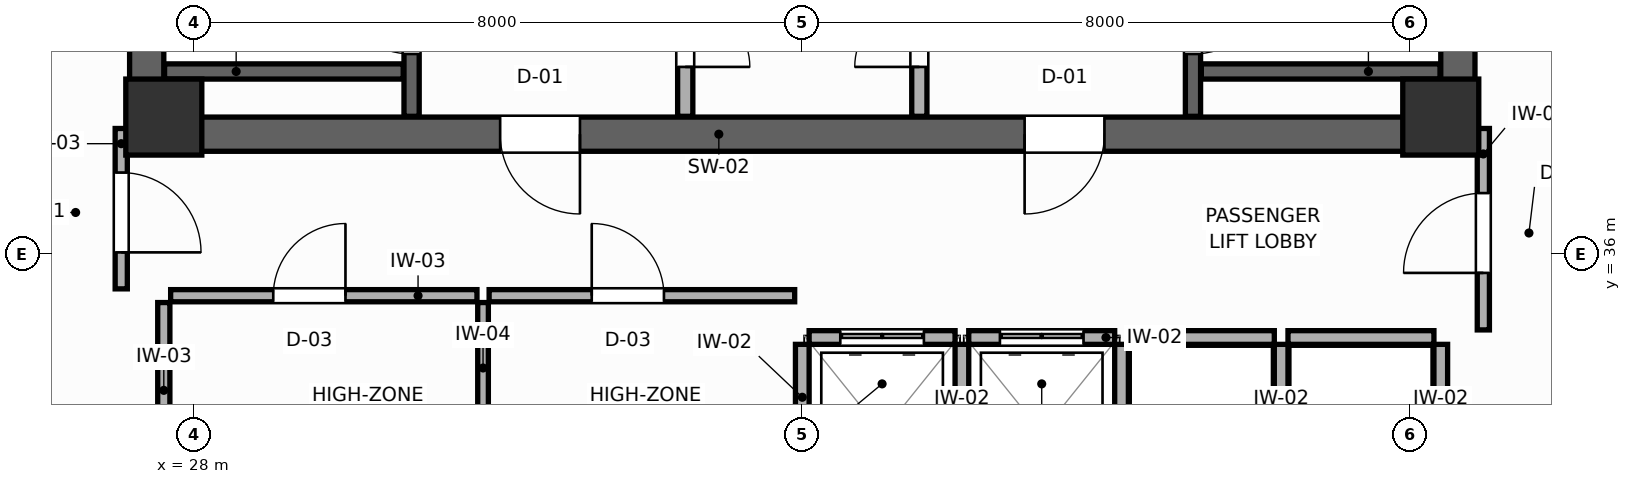
"""IFC4 building model, lengths in metres.
Left out: names, types, materials, properties, quantities, classifications, styles, units other than length and angle.
Written with IfcOpenShell. Run it as: python <this file> out.ifc"""

import sys

from ifc_helpers import new_model, si_unit, direction, frame, frame_2d, origin, origin_2d, place, context, subcontext, project, spatial, rectangle, extrude, source, transform, mapped, element, fill, save


model = new_model("IFC4")
c1 = context("Model", 3, precision=1e-05, world=origin(), true_north=direction((0.0, 1.0)))
c2 = subcontext(c1, "Body", "Model", "MODEL_VIEW")
j1 = project(units=[si_unit("LENGTHUNIT", "METRE"), si_unit("PLANEANGLEUNIT", "RADIAN")], contexts=[c1])
p1 = place(None, origin())
s1 = spatial("IfcSite", under=j1, at=p1, CompositionType="ELEMENT")
p2 = place(p1, origin())
s2 = spatial("IfcBuilding", under=s1, at=p2, CompositionType="ELEMENT")
p3 = place(p2, frame((0.0, 0.0, 179.4)))
s3 = spatial("IfcBuildingStorey", under=s2, at=p3, CompositionType="ELEMENT", Elevation=179.4)
p4 = place(p3, frame((27.15, 37.575, 0.0), z_axis=(0.0, 0.0, 1.0), x_axis=(1.0, 0.0, 0.0)))
e1 = element("IfcWall", 1, at=p4, inside=s3, PredefinedType="SHEAR", context=c2, shape_type="SweptSolid", body=[
    extrude(rectangle(XDim=17.7, YDim=0.45, at=frame_2d((8.85, 0.0))), origin(), (0.0, 0.0, 1.0), 3.6),
])
p5 = place(p4, frame((4.875, 0.0, 0.0)))
e2 = element("IfcOpeningElement", 2, at=p5, cuts=e1, PredefinedType="OPENING", context=c2, shape_type="SweptSolid", body=[
    extrude(rectangle(XDim=1.05, YDim=2.1, at=frame_2d((0.525, 1.05))), frame((0.0, 0.235, 0.0), z_axis=(0.0, -1.0, 0.0), x_axis=(1.0, 0.0, 0.0)), (0.0, 0.0, 1.0), 0.47),
])
p6 = place(p4, frame((11.775, 0.0, 0.0)))
e3 = element("IfcOpeningElement", 3, at=p6, cuts=e1, PredefinedType="OPENING", context=c2, shape_type="SweptSolid", body=[
    extrude(rectangle(XDim=1.05, YDim=2.1, at=frame_2d((0.525, 1.05))), frame((0.0, 0.235, 0.0), z_axis=(0.0, -1.0, 0.0), x_axis=(1.0, 0.0, 0.0)), (0.0, 0.0, 1.0), 0.47),
])
for number, where, z_axis, x_axis in (
    (4, (27.375, 37.8, 0.0), (0.0, 0.0, 1.0), (0.0, 1.0, 0.0)),
    (5, (44.625, 37.8, 0.0), (0.0, 0.0, 1.0), (0.0, 1.0, 0.0)),
):
    element("IfcWall", number, at=place(p3, frame(where, z_axis=z_axis, x_axis=x_axis)), inside=s3, PredefinedType="SHEAR", context=c2, shape_type="SweptSolid", body=[
        extrude(rectangle(XDim=9.0, YDim=0.45, at=frame_2d((4.5, 0.0))), origin(), (0.0, 0.0, 1.0), 3.6),
    ])
m1 = source(origin(), c2, "Body", "SweptSolid", [
    extrude(rectangle(XDim=1.0, YDim=1.0, at=origin_2d()), origin(), (0.0, 0.0, 1.0), 3.6),
])
for number, where, z_axis, x_axis in (
    (6, (27.6, 37.8, 0.0), (0.0, 0.0, 1.0), (1.0, 0.0, 0.0)),
    (7, (44.4, 37.8, 0.0), (0.0, 0.0, 1.0), (1.0, 0.0, 0.0)),
):
    element("IfcColumn", number, at=place(p3, frame(where, z_axis=z_axis, x_axis=x_axis)), inside=s3, PredefinedType="COLUMN", context=c2, shape_type="MappedRepresentation", body=[
        mapped(m1, transform((0.0, 0.0, 0.0), scale=1.0)),
    ])
p7 = place(p3, frame((30.86, 37.81, 0.0), z_axis=(0.0, 0.0, 1.0), x_axis=(0.0, 1.0, 0.0)))
e8 = element("IfcWall", 8, at=p7, inside=s3, PredefinedType="SHEAR", context=c2, shape_type="SweptSolid", body=[
    extrude(rectangle(XDim=8.98, YDim=0.2, at=frame_2d((4.49, 0.0))), origin(), (0.0, 0.0, 1.0), 3.6),
])
p8 = place(p7, frame((0.82, 0.0, 0.0)))
e9 = element("IfcOpeningElement", 9, at=p8, cuts=e8, PredefinedType="OPENING", context=c2, shape_type="SweptSolid", body=[
    extrude(rectangle(XDim=1.05, YDim=2.1, at=frame_2d((0.525, 1.05))), frame((0.0, 0.11, 0.0), z_axis=(0.0, -1.0, 0.0), x_axis=(1.0, 0.0, 0.0)), (0.0, 0.0, 1.0), 0.22),
])
p9 = place(p3, frame((27.61, 38.4, 0.0), z_axis=(0.0, 0.0, 1.0), x_axis=(1.0, 0.0, 0.0)))
e10 = element("IfcWall", 10, at=p9, inside=s3, PredefinedType="SHEAR", context=c2, shape_type="SweptSolid", body=[
    extrude(rectangle(XDim=3.14, YDim=0.2, at=frame_2d((1.57, 0.0))), origin(), (0.0, 0.0, 1.0), 3.6),
])
p10 = place(p3, frame((41.14, 37.81, 0.0), z_axis=(0.0, 0.0, 1.0), x_axis=(0.0, 1.0, 0.0)))
e11 = element("IfcWall", 11, at=p10, inside=s3, PredefinedType="SHEAR", context=c2, shape_type="SweptSolid", body=[
    extrude(rectangle(XDim=8.98, YDim=0.2, at=frame_2d((4.49, 0.0))), origin(), (0.0, 0.0, 1.0), 3.6),
])
p11 = place(p10, frame((0.82, 0.0, 0.0)))
e12 = element("IfcOpeningElement", 12, at=p11, cuts=e11, PredefinedType="OPENING", context=c2, shape_type="SweptSolid", body=[
    extrude(rectangle(XDim=1.05, YDim=2.1, at=frame_2d((0.525, 1.05))), frame((0.0, 0.11, 0.0), z_axis=(0.0, -1.0, 0.0), x_axis=(1.0, 0.0, 0.0)), (0.0, 0.0, 1.0), 0.22),
])
p12 = place(p3, frame((41.25, 38.4, 0.0), z_axis=(0.0, 0.0, 1.0), x_axis=(1.0, 0.0, 0.0)))
e13 = element("IfcWall", 13, at=p12, inside=s3, PredefinedType="SHEAR", context=c2, shape_type="SweptSolid", body=[
    extrude(rectangle(XDim=3.14, YDim=0.2, at=frame_2d((1.57, 0.0))), origin(), (0.0, 0.0, 1.0), 3.6),
])
p13 = place(p3, frame((34.46, 37.81, 0.0), z_axis=(0.0, 0.0, 1.0), x_axis=(0.0, 1.0, 0.0)))
e14 = element("IfcWall", 14, at=p13, inside=s3, PredefinedType="PARTITIONING", context=c2, shape_type="SweptSolid", body=[
    extrude(rectangle(XDim=8.98, YDim=0.2, at=frame_2d((4.49, 0.0))), origin(), (0.0, 0.0, 1.0), 3.4),
])
p14 = place(p13, frame((0.65, 0.0, 0.0)))
e15 = element("IfcOpeningElement", 15, at=p14, cuts=e14, PredefinedType="OPENING", context=c2, shape_type="SweptSolid", body=[
    extrude(rectangle(XDim=0.85, YDim=2.05, at=frame_2d((0.425, 1.025))), frame((0.0, 0.11, 0.0), z_axis=(0.0, -1.0, 0.0), x_axis=(1.0, 0.0, 0.0)), (0.0, 0.0, 1.0), 0.22),
])
p15 = place(p3, frame((37.54, 37.81, 0.0), z_axis=(0.0, 0.0, 1.0), x_axis=(0.0, 1.0, 0.0)))
e16 = element("IfcWall", 16, at=p15, inside=s3, PredefinedType="PARTITIONING", context=c2, shape_type="SweptSolid", body=[
    extrude(rectangle(XDim=8.98, YDim=0.2, at=frame_2d((4.49, 0.0))), origin(), (0.0, 0.0, 1.0), 3.4),
])
p16 = place(p15, frame((0.65, 0.0, 0.0)))
e17 = element("IfcOpeningElement", 17, at=p16, cuts=e16, PredefinedType="OPENING", context=c2, shape_type="SweptSolid", body=[
    extrude(rectangle(XDim=0.85, YDim=2.05, at=frame_2d((0.425, 1.025))), frame((0.0, 0.11, 0.0), z_axis=(0.0, -1.0, 0.0), x_axis=(1.0, 0.0, 0.0)), (0.0, 0.0, 1.0), 0.22),
])
p17 = place(p3, frame((36.09, 34.9, 0.0), z_axis=(0.0, 0.0, 1.0), x_axis=(1.0, 0.0, 0.0)))
e18 = element("IfcWall", 18, at=p17, inside=s3, PredefinedType="PARTITIONING", context=c2, shape_type="SweptSolid", body=[
    extrude(rectangle(XDim=1.92, YDim=0.18, at=frame_2d((0.96, 0.0))), origin(), (0.0, 0.0, 1.0), 3.4),
])
p18 = place(p17, frame((0.41, 0.0, 0.0)))
e19 = element("IfcOpeningElement", 19, at=p18, cuts=e18, PredefinedType="OPENING", context=c2, shape_type="SweptSolid", body=[
    extrude(rectangle(XDim=1.1, YDim=2.1, at=frame_2d((0.55, 1.05))), frame((0.0, 0.1, 0.0), z_axis=(0.0, -1.0, 0.0), x_axis=(1.0, 0.0, 0.0)), (0.0, 0.0, 1.0), 0.2),
])
p19 = place(p3, frame((36.0, 32.49, 0.0), z_axis=(0.0, 0.0, 1.0), x_axis=(0.0, 1.0, 0.0)))
e20 = element("IfcWall", 20, at=p19, inside=s3, PredefinedType="PARTITIONING", context=c2, shape_type="SweptSolid", body=[
    extrude(rectangle(XDim=2.32, YDim=0.18, at=frame_2d((1.16, 0.0))), origin(), (0.0, 0.0, 1.0), 3.4),
])
p20 = place(p3, frame((38.19, 34.9, 0.0), z_axis=(0.0, 0.0, 1.0), x_axis=(1.0, 0.0, 0.0)))
e21 = element("IfcWall", 21, at=p20, inside=s3, PredefinedType="PARTITIONING", context=c2, shape_type="SweptSolid", body=[
    extrude(rectangle(XDim=1.92, YDim=0.18, at=frame_2d((0.96, 0.0))), origin(), (0.0, 0.0, 1.0), 3.4),
])
p21 = place(p20, frame((0.41, 0.0, 0.0)))
e22 = element("IfcOpeningElement", 22, at=p21, cuts=e21, PredefinedType="OPENING", context=c2, shape_type="SweptSolid", body=[
    extrude(rectangle(XDim=1.1, YDim=2.1, at=frame_2d((0.55, 1.05))), frame((0.0, 0.1, 0.0), z_axis=(0.0, -1.0, 0.0), x_axis=(1.0, 0.0, 0.0)), (0.0, 0.0, 1.0), 0.2),
])
p22 = place(p3, frame((38.1, 32.49, 0.0), z_axis=(0.0, 0.0, 1.0), x_axis=(0.0, 1.0, 0.0)))
e23 = element("IfcWall", 23, at=p22, inside=s3, PredefinedType="PARTITIONING", context=c2, shape_type="SweptSolid", body=[
    extrude(rectangle(XDim=2.32, YDim=0.18, at=frame_2d((1.16, 0.0))), origin(), (0.0, 0.0, 1.0), 3.4),
])
p23 = place(p3, frame((40.29, 34.9, 0.0), z_axis=(0.0, 0.0, 1.0), x_axis=(1.0, 0.0, 0.0)))
e24 = element("IfcWall", 24, at=p23, inside=s3, PredefinedType="PARTITIONING", context=c2, shape_type="SweptSolid", body=[
    extrude(rectangle(XDim=1.92, YDim=0.18, at=frame_2d((0.96, 0.0))), origin(), (0.0, 0.0, 1.0), 3.4),
])
p24 = place(p3, frame((40.2, 32.49, 0.0), z_axis=(0.0, 0.0, 1.0), x_axis=(0.0, 1.0, 0.0)))
e25 = element("IfcWall", 25, at=p24, inside=s3, PredefinedType="PARTITIONING", context=c2, shape_type="SweptSolid", body=[
    extrude(rectangle(XDim=2.32, YDim=0.18, at=frame_2d((1.16, 0.0))), origin(), (0.0, 0.0, 1.0), 3.4),
])
p25 = place(p3, frame((42.39, 34.9, 0.0), z_axis=(0.0, 0.0, 1.0), x_axis=(1.0, 0.0, 0.0)))
e26 = element("IfcWall", 26, at=p25, inside=s3, PredefinedType="PARTITIONING", context=c2, shape_type="SweptSolid", body=[
    extrude(rectangle(XDim=1.92, YDim=0.18, at=frame_2d((0.96, 0.0))), origin(), (0.0, 0.0, 1.0), 3.4),
])
for number, where, z_axis, x_axis in (
    (27, (42.3, 32.49, 0.0), (0.0, 0.0, 1.0), (0.0, 1.0, 0.0)),
    (28, (44.4, 32.49, 0.0), (0.0, 0.0, 1.0), (0.0, 1.0, 0.0)),
):
    element("IfcWall", number, at=place(p3, frame(where, z_axis=z_axis, x_axis=x_axis)), inside=s3, PredefinedType="PARTITIONING", context=c2, shape_type="SweptSolid", body=[
        extrude(rectangle(XDim=2.32, YDim=0.18, at=frame_2d((1.16, 0.0))), origin(), (0.0, 0.0, 1.0), 3.4),
    ])
p26 = place(p3, frame((27.6, 33.05, 0.0), z_axis=(0.0, 0.0, 1.0), x_axis=(0.0, 1.0, 0.0)))
e29 = element("IfcWall", 29, at=p26, inside=s3, PredefinedType="PARTITIONING", context=c2, shape_type="SweptSolid", body=[
    extrude(rectangle(XDim=2.31, YDim=0.16, at=frame_2d((1.155, 0.0))), origin(), (0.0, 0.0, 1.0), 3.4),
])
p27 = place(p3, frame((31.8, 32.49, 0.0), z_axis=(0.0, 0.0, 1.0), x_axis=(0.0, 1.0, 0.0)))
e30 = element("IfcWall", 30, at=p27, inside=s3, PredefinedType="PARTITIONING", context=c2, shape_type="SweptSolid", body=[
    extrude(rectangle(XDim=2.87, YDim=0.14, at=frame_2d((1.435, 0.0))), origin(), (0.0, 0.0, 1.0), 3.4),
])
p28 = place(p3, frame((27.69, 35.45, 0.0), z_axis=(0.0, 0.0, 1.0), x_axis=(1.0, 0.0, 0.0)))
e31 = element("IfcWall", 31, at=p28, inside=s3, PredefinedType="PARTITIONING", context=c2, shape_type="SweptSolid", body=[
    extrude(rectangle(XDim=4.03, YDim=0.16, at=frame_2d((2.015, 0.0))), origin(), (0.0, 0.0, 1.0), 3.4),
])
p29 = place(p28, frame((1.35, 0.0, 0.0)))
e32 = element("IfcOpeningElement", 32, at=p29, cuts=e31, PredefinedType="OPENING", context=c2, shape_type="SweptSolid", body=[
    extrude(rectangle(XDim=0.95, YDim=2.05, at=frame_2d((0.475, 1.025))), frame((0.0, 0.09, 0.0), z_axis=(0.0, -1.0, 0.0), x_axis=(1.0, 0.0, 0.0)), (0.0, 0.0, 1.0), 0.18),
])
p30 = place(p3, frame((31.88, 35.45, 0.0), z_axis=(0.0, 0.0, 1.0), x_axis=(1.0, 0.0, 0.0)))
e33 = element("IfcWall", 33, at=p30, inside=s3, PredefinedType="PARTITIONING", context=c2, shape_type="SweptSolid", body=[
    extrude(rectangle(XDim=4.02, YDim=0.16, at=frame_2d((2.01, 0.0))), origin(), (0.0, 0.0, 1.0), 3.4),
])
p31 = place(p30, frame((1.35, 0.0, 0.0)))
e34 = element("IfcOpeningElement", 34, at=p31, cuts=e33, PredefinedType="OPENING", context=c2, shape_type="SweptSolid", body=[
    extrude(rectangle(XDim=0.95, YDim=2.05, at=frame_2d((0.475, 1.025))), frame((0.0, 0.09, 0.0), z_axis=(0.0, -1.0, 0.0), x_axis=(1.0, 0.0, 0.0)), (0.0, 0.0, 1.0), 0.18),
])
p32 = place(p3, frame((27.04, 35.54, 0.0), z_axis=(0.0, 0.0, 1.0), x_axis=(0.0, 1.0, 0.0)))
e35 = element("IfcWall", 35, at=p32, inside=s3, PredefinedType="PARTITIONING", context=c2, shape_type="SweptSolid", body=[
    extrude(rectangle(XDim=2.11, YDim=0.16, at=frame_2d((1.055, 0.0))), origin(), (0.0, 0.0, 1.0), 3.4),
])
p33 = place(p32, frame((0.48, 0.0, 0.0)))
e36 = element("IfcOpeningElement", 36, at=p33, cuts=e35, PredefinedType="OPENING", context=c2, shape_type="SweptSolid", body=[
    extrude(rectangle(XDim=1.05, YDim=2.1, at=frame_2d((0.525, 1.05))), frame((0.0, 0.09, 0.0), z_axis=(0.0, -1.0, 0.0), x_axis=(1.0, 0.0, 0.0)), (0.0, 0.0, 1.0), 0.18),
])
p34 = place(p3, frame((44.96, 35.0, 0.0), z_axis=(0.0, 0.0, 1.0), x_axis=(0.0, 1.0, 0.0)))
e37 = element("IfcWall", 37, at=p34, inside=s3, PredefinedType="PARTITIONING", context=c2, shape_type="SweptSolid", body=[
    extrude(rectangle(XDim=2.65, YDim=0.16, at=frame_2d((1.325, 0.0))), origin(), (0.0, 0.0, 1.0), 3.4),
])
p35 = place(p34, frame((0.75, 0.0, 0.0)))
e38 = element("IfcOpeningElement", 38, at=p35, cuts=e37, PredefinedType="OPENING", context=c2, shape_type="SweptSolid", body=[
    extrude(rectangle(XDim=1.05, YDim=2.1, at=frame_2d((0.525, 1.05))), frame((0.0, 0.09, 0.0), z_axis=(0.0, -1.0, 0.0), x_axis=(1.0, 0.0, 0.0)), (0.0, 0.0, 1.0), 0.18),
])
p36 = place(p8, origin())
e39 = element("IfcDoor", 39, at=p36, inside=s3, OperationType="SINGLE_SWING_RIGHT", PredefinedType="DOOR", context=c2, shape_type="SweptSolid", body=[
    extrude(rectangle(XDim=1.05, YDim=2.1, at=frame_2d((0.525, 1.05))), frame((0.0, 0.025, 0.0), z_axis=(0.0, -1.0, 0.0), x_axis=(1.0, 0.0, 0.0)), (0.0, 0.0, 1.0), 0.05),
])
fill(e9, e39)
p37 = place(p11, frame((1.05, 0.0, 0.0), z_axis=(0.0, 0.0, 1.0), x_axis=(-1.0, 0.0, 0.0)))
e40 = element("IfcDoor", 40, at=p37, inside=s3, OperationType="SINGLE_SWING_LEFT", PredefinedType="DOOR", context=c2, shape_type="SweptSolid", body=[
    extrude(rectangle(XDim=1.05, YDim=2.1, at=frame_2d((0.525, 1.05))), frame((0.0, 0.025, 0.0), z_axis=(0.0, -1.0, 0.0), x_axis=(1.0, 0.0, 0.0)), (0.0, 0.0, 1.0), 0.05),
])
fill(e12, e40)
p38 = place(p14, frame((0.85, 0.0, 0.0), z_axis=(0.0, 0.0, 1.0), x_axis=(-1.0, 0.0, 0.0)))
e41 = element("IfcDoor", 41, at=p38, inside=s3, OperationType="SINGLE_SWING_RIGHT", PredefinedType="DOOR", context=c2, shape_type="SweptSolid", body=[
    extrude(rectangle(XDim=0.85, YDim=2.05, at=frame_2d((0.425, 1.025))), frame((0.0, 0.025, 0.0), z_axis=(0.0, -1.0, 0.0), x_axis=(1.0, 0.0, 0.0)), (0.0, 0.0, 1.0), 0.05),
])
fill(e15, e41)
p39 = place(p16, origin())
e42 = element("IfcDoor", 42, at=p39, inside=s3, OperationType="SINGLE_SWING_LEFT", PredefinedType="DOOR", context=c2, shape_type="SweptSolid", body=[
    extrude(rectangle(XDim=0.85, YDim=2.05, at=frame_2d((0.425, 1.025))), frame((0.0, 0.025, 0.0), z_axis=(0.0, -1.0, 0.0), x_axis=(1.0, 0.0, 0.0)), (0.0, 0.0, 1.0), 0.05),
])
fill(e17, e42)
p40 = place(p18, origin())
e43 = element("IfcDoor", 43, at=p40, inside=s3, OperationType="DOUBLE_DOOR_SLIDING", PredefinedType="DOOR", context=c2, shape_type="SweptSolid", body=[
    extrude(rectangle(XDim=1.1, YDim=2.1, at=frame_2d((0.55, 1.05))), frame((0.0, 0.025, 0.0), z_axis=(0.0, -1.0, 0.0), x_axis=(1.0, 0.0, 0.0)), (0.0, 0.0, 1.0), 0.05),
])
fill(e19, e43)
p41 = place(p21, origin())
e44 = element("IfcDoor", 44, at=p41, inside=s3, OperationType="DOUBLE_DOOR_SLIDING", PredefinedType="DOOR", context=c2, shape_type="SweptSolid", body=[
    extrude(rectangle(XDim=1.1, YDim=2.1, at=frame_2d((0.55, 1.05))), frame((0.0, 0.025, 0.0), z_axis=(0.0, -1.0, 0.0), x_axis=(1.0, 0.0, 0.0)), (0.0, 0.0, 1.0), 0.05),
])
fill(e22, e44)
p42 = place(p29, origin())
e45 = element("IfcDoor", 45, at=p42, inside=s3, OperationType="SINGLE_SWING_RIGHT", PredefinedType="DOOR", context=c2, shape_type="SweptSolid", body=[
    extrude(rectangle(XDim=0.95, YDim=2.05, at=frame_2d((0.475, 1.025))), frame((0.0, 0.025, 0.0), z_axis=(0.0, -1.0, 0.0), x_axis=(1.0, 0.0, 0.0)), (0.0, 0.0, 1.0), 0.05),
])
fill(e32, e45)
p43 = place(p31, origin())
e46 = element("IfcDoor", 46, at=p43, inside=s3, OperationType="SINGLE_SWING_LEFT", PredefinedType="DOOR", context=c2, shape_type="SweptSolid", body=[
    extrude(rectangle(XDim=0.95, YDim=2.05, at=frame_2d((0.475, 1.025))), frame((0.0, 0.025, 0.0), z_axis=(0.0, -1.0, 0.0), x_axis=(1.0, 0.0, 0.0)), (0.0, 0.0, 1.0), 0.05),
])
fill(e34, e46)
p44 = place(p33, frame((1.05, 0.0, 0.0), z_axis=(0.0, 0.0, 1.0), x_axis=(-1.0, 0.0, 0.0)))
e47 = element("IfcDoor", 47, at=p44, inside=s3, OperationType="SINGLE_SWING_RIGHT", PredefinedType="DOOR", context=c2, shape_type="SweptSolid", body=[
    extrude(rectangle(XDim=1.05, YDim=2.1, at=frame_2d((0.525, 1.05))), frame((0.0, 0.025, 0.0), z_axis=(0.0, -1.0, 0.0), x_axis=(1.0, 0.0, 0.0)), (0.0, 0.0, 1.0), 0.05),
])
fill(e36, e47)
p45 = place(p35, origin())
e48 = element("IfcDoor", 48, at=p45, inside=s3, OperationType="SINGLE_SWING_LEFT", PredefinedType="DOOR", context=c2, shape_type="SweptSolid", body=[
    extrude(rectangle(XDim=1.05, YDim=2.1, at=frame_2d((0.525, 1.05))), frame((0.0, 0.025, 0.0), z_axis=(0.0, -1.0, 0.0), x_axis=(1.0, 0.0, 0.0)), (0.0, 0.0, 1.0), 0.05),
])
fill(e38, e48)
p46 = place(p5, frame((1.05, 0.0, 0.0), z_axis=(0.0, 0.0, 1.0), x_axis=(-1.0, 0.0, 0.0)))
e49 = element("IfcDoor", 49, at=p46, inside=s3, OperationType="SINGLE_SWING_LEFT", PredefinedType="DOOR", context=c2, shape_type="SweptSolid", body=[
    extrude(rectangle(XDim=1.05, YDim=2.1, at=frame_2d((0.525, 1.05))), frame((0.0, 0.025, 0.0), z_axis=(0.0, -1.0, 0.0), x_axis=(1.0, 0.0, 0.0)), (0.0, 0.0, 1.0), 0.05),
])
fill(e2, e49)
p47 = place(p6, frame((1.05, 0.0, 0.0), z_axis=(0.0, 0.0, 1.0), x_axis=(-1.0, 0.0, 0.0)))
e50 = element("IfcDoor", 50, at=p47, inside=s3, OperationType="SINGLE_SWING_RIGHT", PredefinedType="DOOR", context=c2, shape_type="SweptSolid", body=[
    extrude(rectangle(XDim=1.05, YDim=2.1, at=frame_2d((0.525, 1.05))), frame((0.0, 0.025, 0.0), z_axis=(0.0, -1.0, 0.0), x_axis=(1.0, 0.0, 0.0)), (0.0, 0.0, 1.0), 0.05),
])
fill(e3, e50)
save(model, sys.argv[1])
